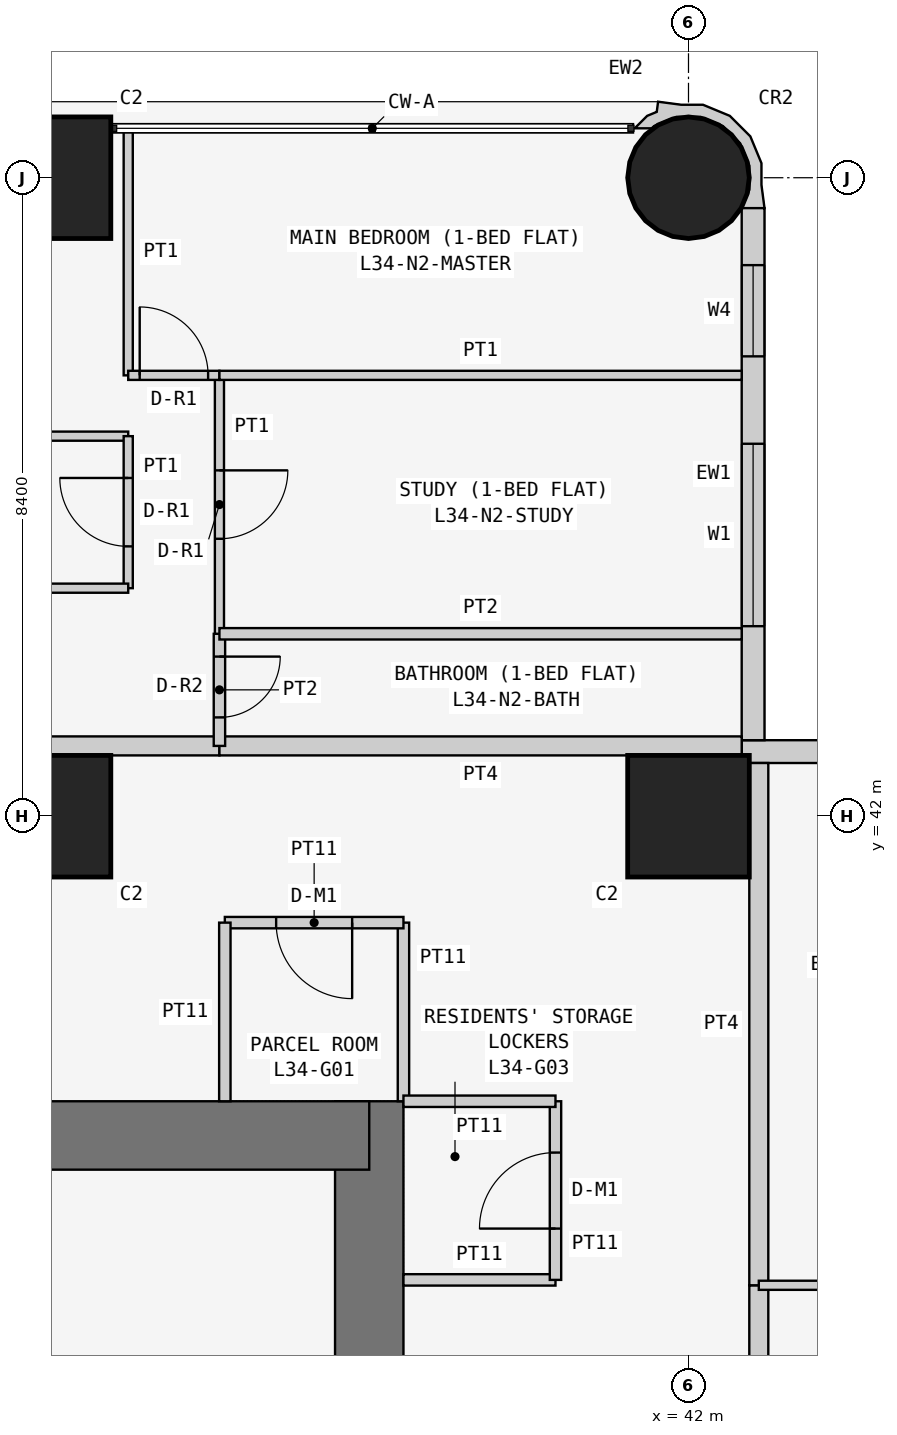
"""IFC4 building model, lengths in metres.
Left out: names, types, materials, properties, quantities, classifications, styles, units other than length and angle.
Written with IfcOpenShell. Run it as: python <this file> out.ifc"""

import sys

from ifc_helpers import new_model, si_unit, direction, frame, frame_2d, origin, origin_2d, place, context, subcontext, project, spatial, polyline, rectangle, circle, outline, extrude, element, fill, save


model = new_model("IFC4")
c1 = context("Model", 3, precision=1e-05, world=origin(), true_north=direction((0.0, 1.0)))
c2 = subcontext(c1, "Body", "Model", "MODEL_VIEW")
j1 = project(units=[si_unit("LENGTHUNIT", "METRE"), si_unit("PLANEANGLEUNIT", "RADIAN")], contexts=[c1])
p1 = place(None, origin())
s1 = spatial("IfcSite", under=j1, at=p1, CompositionType="ELEMENT")
p2 = place(p1, origin())
s2 = spatial("IfcBuilding", under=s1, at=p2, CompositionType="ELEMENT")
p3 = place(p2, frame((0.0, 0.0, 134.1)))
s3 = spatial("IfcBuildingStorey", under=s2, at=p3, CompositionType="ELEMENT", Elevation=134.1)
for number, where, z_axis, x_axis in (
    (1, (33.6, 42.0, 0.0), (0.0, 0.0, 1.0), (1.0, 0.0, 0.0)),
    (2, (33.6, 50.4, 0.0), (0.0, 0.0, 1.0), (1.0, 0.0, 0.0)),
    (3, (42.0, 42.0, 0.0), (0.0, 0.0, 1.0), (1.0, 0.0, 0.0)),
):
    element("IfcColumn", number, at=place(p3, frame(where, z_axis=z_axis, x_axis=x_axis)), inside=s3, PredefinedType="COLUMN", context=c2, shape_type="SweptSolid", body=[
        extrude(rectangle(XDim=1.6, YDim=1.6, at=origin_2d()), origin(), (0.0, 0.0, 1.0), 3.6),
    ])
p4 = place(p3, frame((42.0, 50.4, 0.0), z_axis=(0.0, 0.0, 1.0), x_axis=(1.0, 0.0, 0.0)))
e4 = element("IfcColumn", 4, at=p4, inside=s3, PredefinedType="COLUMN", context=c2, shape_type="SweptSolid", body=[
    extrude(circle(Radius=0.8, at=origin_2d()), origin(), (0.0, 0.0, 1.0), 3.6),
])
p5 = place(p3, frame((37.8, 21.0, 0.0), z_axis=(0.0, 0.0, 1.0), x_axis=(0.0, 1.0, 0.0)))
e5 = element("IfcWall", 5, at=p5, inside=s3, PredefinedType="SHEAR", context=c2, shape_type="SweptSolid", body=[
    extrude(rectangle(XDim=17.25, YDim=0.9, at=frame_2d((8.625, 0.0))), origin(), (0.0, 0.0, 1.0), 3.6),
])
p6 = place(p5, frame((5.2, 0.0, 0.0)))
e6 = element("IfcOpeningElement", 6, at=p6, cuts=e5, PredefinedType="OPENING", context=c2, shape_type="SweptSolid", body=[
    extrude(rectangle(XDim=1.2, YDim=2.1, at=frame_2d((0.6, 1.05))), frame((0.0, 0.46, 0.0), z_axis=(0.0, -1.0, 0.0), x_axis=(1.0, 0.0, 0.0)), (0.0, 0.0, 1.0), 0.92),
])
p7 = place(p3, frame((37.8, 37.8, 0.0), z_axis=(0.0, 0.0, 1.0), x_axis=(-1.0, 0.0, 0.0)))
e7 = element("IfcWall", 7, at=p7, inside=s3, PredefinedType="SHEAR", context=c2, shape_type="SweptSolid", body=[
    extrude(rectangle(XDim=17.25, YDim=0.9, at=frame_2d((8.625, 0.0))), origin(), (0.0, 0.0, 1.0), 3.6),
])
p8 = place(p3, frame((58.4, 42.85, 0.0), z_axis=(0.0, 0.0, 1.0), x_axis=(-1.0, 0.0, 0.0)))
e8 = element("IfcWall", 8, at=p8, inside=s3, PredefinedType="SOLIDWALL", context=c2, shape_type="SweptSolid", body=[
    extrude(rectangle(XDim=15.7, YDim=0.3, at=frame_2d((7.85, 0.0))), origin(), (0.0, 0.0, 1.0), 3.45),
])
p9 = place(p8, frame((12.4, 0.0, 0.9)))
e9 = element("IfcOpeningElement", 9, at=p9, cuts=e8, PredefinedType="OPENING", context=c2, shape_type="SweptSolid", body=[
    extrude(rectangle(XDim=1.8, YDim=1.5, at=frame_2d((0.9, 0.75))), frame((0.0, 0.16, 0.0), z_axis=(0.0, -1.0, 0.0), x_axis=(1.0, 0.0, 0.0)), (0.0, 0.0, 1.0), 0.32),
])
p10 = place(p8, frame((9.55, 0.0, 1.5)))
e10 = element("IfcOpeningElement", 10, at=p10, cuts=e8, PredefinedType="OPENING", context=c2, shape_type="SweptSolid", body=[
    extrude(rectangle(XDim=0.9, YDim=0.7, at=frame_2d((0.45, 0.35))), frame((0.0, 0.16, 0.0), z_axis=(0.0, -1.0, 0.0), x_axis=(1.0, 0.0, 0.0)), (0.0, 0.0, 1.0), 0.32),
])
p11 = place(p8, frame((5.1, 0.0, 0.9)))
e11 = element("IfcOpeningElement", 11, at=p11, cuts=e8, PredefinedType="OPENING", context=c2, shape_type="SweptSolid", body=[
    extrude(rectangle(XDim=1.8, YDim=1.5, at=frame_2d((0.9, 0.75))), frame((0.0, 0.16, 0.0), z_axis=(0.0, -1.0, 0.0), x_axis=(1.0, 0.0, 0.0)), (0.0, 0.0, 1.0), 0.32),
])
p12 = place(p8, frame((2.0, 0.0, 0.0)))
e12 = element("IfcOpeningElement", 12, at=p12, cuts=e8, PredefinedType="OPENING", context=c2, shape_type="SweptSolid", body=[
    extrude(rectangle(XDim=0.9, YDim=2.4, at=frame_2d((0.45, 1.2))), frame((0.0, 0.16, 0.0), z_axis=(0.0, -1.0, 0.0), x_axis=(1.0, 0.0, 0.0)), (0.0, 0.0, 1.0), 0.32),
])
p13 = place(p8, frame((0.7, 0.0, 0.9)))
e13 = element("IfcOpeningElement", 13, at=p13, cuts=e8, PredefinedType="OPENING", context=c2, shape_type="SweptSolid", body=[
    extrude(rectangle(XDim=1.2, YDim=1.5, at=frame_2d((0.6, 0.75))), frame((0.0, 0.16, 0.0), z_axis=(0.0, -1.0, 0.0), x_axis=(1.0, 0.0, 0.0)), (0.0, 0.0, 1.0), 0.32),
])
p14 = place(p3, frame((42.85, 43.0, 0.0), z_axis=(0.0, 0.0, 1.0), x_axis=(0.0, 1.0, 0.0)))
e14 = element("IfcWall", 14, at=p14, inside=s3, PredefinedType="SOLIDWALL", context=c2, shape_type="SweptSolid", body=[
    extrude(rectangle(XDim=7.0, YDim=0.3, at=frame_2d((3.5, 0.0))), origin(), (0.0, 0.0, 1.0), 3.45),
])
p15 = place(p14, frame((1.5, 0.0, 0.9)))
e15 = element("IfcOpeningElement", 15, at=p15, cuts=e14, PredefinedType="OPENING", context=c2, shape_type="SweptSolid", body=[
    extrude(rectangle(XDim=2.4, YDim=1.5, at=frame_2d((1.2, 0.75))), frame((0.0, 0.16, 0.0), z_axis=(0.0, -1.0, 0.0), x_axis=(1.0, 0.0, 0.0)), (0.0, 0.0, 1.0), 0.32),
])
p16 = place(p14, frame((5.05, 0.0, 0.9)))
e16 = element("IfcOpeningElement", 16, at=p16, cuts=e14, PredefinedType="OPENING", context=c2, shape_type="SweptSolid", body=[
    extrude(rectangle(XDim=1.2, YDim=1.5, at=frame_2d((0.6, 0.75))), frame((0.0, 0.16, 0.0), z_axis=(0.0, -1.0, 0.0), x_axis=(1.0, 0.0, 0.0)), (0.0, 0.0, 1.0), 0.32),
])
p17 = place(p3, frame((42.817, 50.073, 0.0), z_axis=(0.0, 0.0, 1.0), x_axis=(0.343276641956, 0.93923434088, 0.0)))
e17 = element("IfcWall", 17, at=p17, inside=s3, PredefinedType="SOLIDWALL", context=c2, shape_type="SweptSolid", body=[
    extrude(outline(polyline([(0.266, -0.055), (0.535, 0.044), (0.817, 0.302), (0.978, 0.648), (0.994, 1.03), (0.895, 1.3), (0.828, 1.598), (0.697, 1.569), (0.604, 1.67), (0.394, 1.767), (0.471, 1.556), (0.509, 1.539), (0.724, 1.304), (0.833, 1.005), (0.82, 0.687), (0.686, 0.397), (0.451, 0.182), (0.152, 0.073), (-0.116, 0.084), (-0.128, 0.078), (-0.146, 0.071), (-0.006, -0.197), (0.266, -0.055)])), origin(), (0.0, 0.0, 1.0), 3.45),
])
p18 = place(p3, frame((38.25, 38.25, 0.0), z_axis=(0.0, 0.0, 1.0), x_axis=(0.0, 1.0, 0.0)))
e18 = element("IfcWall", 18, at=p18, inside=s3, PredefinedType="PARTITIONING", context=c2, shape_type="SweptSolid", body=[
    extrude(rectangle(XDim=2.35, YDim=0.15, at=frame_2d((1.175, 0.0))), origin(), (0.0, 0.0, 1.0), 3.45),
])
p19 = place(p3, frame((38.25, 40.6, 0.0), z_axis=(0.0, 0.0, 1.0), x_axis=(-1.0, 0.0, 0.0)))
e19 = element("IfcWall", 19, at=p19, inside=s3, PredefinedType="PARTITIONING", context=c2, shape_type="SweptSolid", body=[
    extrude(rectangle(XDim=2.35, YDim=0.15, at=frame_2d((1.175, 0.0))), origin(), (0.0, 0.0, 1.0), 3.45),
])
p20 = place(p19, frame((0.675, 0.0, 0.0)))
e20 = element("IfcOpeningElement", 20, at=p20, cuts=e19, PredefinedType="OPENING", context=c2, shape_type="SweptSolid", body=[
    extrude(rectangle(XDim=1.0, YDim=2.1, at=frame_2d((0.5, 1.05))), frame((0.0, 0.085, 0.0), z_axis=(0.0, -1.0, 0.0), x_axis=(1.0, 0.0, 0.0)), (0.0, 0.0, 1.0), 0.17),
])
p21 = place(p3, frame((35.9, 40.6, 0.0), z_axis=(0.0, 0.0, 1.0), x_axis=(0.0, -1.0, 0.0)))
e21 = element("IfcWall", 21, at=p21, inside=s3, PredefinedType="PARTITIONING", context=c2, shape_type="SweptSolid", body=[
    extrude(rectangle(XDim=2.35, YDim=0.15, at=frame_2d((1.175, 0.0))), origin(), (0.0, 0.0, 1.0), 3.45),
])
p22 = place(p3, frame((38.25, 35.9, 0.0), z_axis=(0.0, 0.0, 1.0), x_axis=(1.0, 0.0, 0.0)))
e22 = element("IfcWall", 22, at=p22, inside=s3, PredefinedType="PARTITIONING", context=c2, shape_type="SweptSolid", body=[
    extrude(rectangle(XDim=2.0, YDim=0.15, at=frame_2d((1.0, 0.0))), origin(), (0.0, 0.0, 1.0), 3.45),
])
p23 = place(p3, frame((40.25, 35.9, 0.0), z_axis=(0.0, 0.0, 1.0), x_axis=(0.0, 1.0, 0.0)))
e23 = element("IfcWall", 23, at=p23, inside=s3, PredefinedType="PARTITIONING", context=c2, shape_type="SweptSolid", body=[
    extrude(rectangle(XDim=2.35, YDim=0.15, at=frame_2d((1.175, 0.0))), origin(), (0.0, 0.0, 1.0), 3.45),
])
p24 = place(p23, frame((0.675, 0.0, 0.0)))
e24 = element("IfcOpeningElement", 24, at=p24, cuts=e23, PredefinedType="OPENING", context=c2, shape_type="SweptSolid", body=[
    extrude(rectangle(XDim=1.0, YDim=2.1, at=frame_2d((0.5, 1.05))), frame((0.0, 0.085, 0.0), z_axis=(0.0, -1.0, 0.0), x_axis=(1.0, 0.0, 0.0)), (0.0, 0.0, 1.0), 0.17),
])
p25 = place(p3, frame((40.25, 38.25, 0.0), z_axis=(0.0, 0.0, 1.0), x_axis=(-1.0, 0.0, 0.0)))
e25 = element("IfcWall", 25, at=p25, inside=s3, PredefinedType="PARTITIONING", context=c2, shape_type="SweptSolid", body=[
    extrude(rectangle(XDim=2.0, YDim=0.15, at=frame_2d((1.0, 0.0))), origin(), (0.0, 0.0, 1.0), 3.45),
])
p26 = place(p3, frame((29.4, 42.925, 0.0), z_axis=(0.0, 0.0, 1.0), x_axis=(1.0, 0.0, 0.0)))
e26 = element("IfcWall", 26, at=p26, inside=s3, PredefinedType="PARTITIONING", context=c2, shape_type="SweptSolid", body=[
    extrude(rectangle(XDim=6.429, YDim=0.25, at=frame_2d((3.215, 0.0))), origin(), (0.0, 0.0, 1.0), 3.45),
])
p27 = place(p26, frame((0.5, 0.0, 0.0)))
e27 = element("IfcOpeningElement", 27, at=p27, cuts=e26, PredefinedType="OPENING", context=c2, shape_type="SweptSolid", body=[
    extrude(rectangle(XDim=1.0, YDim=2.1, at=frame_2d((0.5, 1.05))), frame((0.0, 0.135, 0.0), z_axis=(0.0, -1.0, 0.0), x_axis=(1.0, 0.0, 0.0)), (0.0, 0.0, 1.0), 0.27),
])
p28 = place(p3, frame((35.829, 42.925, 0.0), z_axis=(0.0, 0.0, 1.0), x_axis=(1.0, 0.0, 0.0)))
e28 = element("IfcWall", 28, at=p28, inside=s3, PredefinedType="PARTITIONING", context=c2, shape_type="SweptSolid", body=[
    extrude(rectangle(XDim=6.871, YDim=0.25, at=frame_2d((3.436, 0.0))), origin(), (0.0, 0.0, 1.0), 3.45),
])
p29 = place(p3, frame((42.925, 35.829, 0.0), z_axis=(0.0, 0.0, 1.0), x_axis=(0.0, -1.0, 0.0)))
e29 = element("IfcWall", 29, at=p29, inside=s3, PredefinedType="PARTITIONING", context=c2, shape_type="SweptSolid", body=[
    extrude(rectangle(XDim=1.2, YDim=0.25, at=frame_2d((0.6, 0.0))), origin(), (0.0, 0.0, 1.0), 3.45),
])
p30 = place(p3, frame((42.925, 42.7, 0.0), z_axis=(0.0, 0.0, 1.0), x_axis=(0.0, -1.0, 0.0)))
e30 = element("IfcWall", 30, at=p30, inside=s3, PredefinedType="PARTITIONING", context=c2, shape_type="SweptSolid", body=[
    extrude(rectangle(XDim=6.871, YDim=0.25, at=frame_2d((3.436, 0.0))), origin(), (0.0, 0.0, 1.0), 3.45),
])
p31 = place(p3, frame((29.4, 47.0, 0.0), z_axis=(0.0, 0.0, 1.0), x_axis=(1.0, 0.0, 0.0)))
e31 = element("IfcWall", 31, at=p31, inside=s3, PredefinedType="PARTITIONING", context=c2, shape_type="SweptSolid", body=[
    extrude(rectangle(XDim=5.229, YDim=0.12, at=frame_2d((2.615, 0.0))), origin(), (0.0, 0.0, 1.0), 3.45),
])
p32 = place(p3, frame((34.629, 47.0, 0.0), z_axis=(0.0, 0.0, 1.0), x_axis=(0.0, -1.0, 0.0)))
e32 = element("IfcWall", 32, at=p32, inside=s3, PredefinedType="PARTITIONING", context=c2, shape_type="SweptSolid", body=[
    extrude(rectangle(XDim=2.0, YDim=0.12, at=frame_2d((1.0, 0.0))), origin(), (0.0, 0.0, 1.0), 3.45),
])
p33 = place(p32, frame((0.55, 0.0, 0.0)))
e33 = element("IfcOpeningElement", 33, at=p33, cuts=e32, PredefinedType="OPENING", context=c2, shape_type="SweptSolid", body=[
    extrude(rectangle(XDim=0.9, YDim=2.1, at=frame_2d((0.45, 1.05))), frame((0.0, 0.07, 0.0), z_axis=(0.0, -1.0, 0.0), x_axis=(1.0, 0.0, 0.0)), (0.0, 0.0, 1.0), 0.14),
])
p34 = place(p3, frame((34.629, 45.0, 0.0), z_axis=(0.0, 0.0, 1.0), x_axis=(-1.0, 0.0, 0.0)))
e34 = element("IfcWall", 34, at=p34, inside=s3, PredefinedType="PARTITIONING", context=c2, shape_type="SweptSolid", body=[
    extrude(rectangle(XDim=5.229, YDim=0.12, at=frame_2d((2.615, 0.0))), origin(), (0.0, 0.0, 1.0), 3.45),
])
p35 = place(p3, frame((35.829, 44.4, 0.0), z_axis=(0.0, 0.0, 1.0), x_axis=(0.0, -1.0, 0.0)))
e35 = element("IfcWall", 35, at=p35, inside=s3, PredefinedType="PARTITIONING", context=c2, shape_type="SweptSolid", body=[
    extrude(rectangle(XDim=1.475, YDim=0.15, at=frame_2d((0.737, 0.0))), origin(), (0.0, 0.0, 1.0), 3.45),
])
p36 = place(p35, frame((0.3, 0.0, 0.0)))
e36 = element("IfcOpeningElement", 36, at=p36, cuts=e35, PredefinedType="OPENING", context=c2, shape_type="SweptSolid", body=[
    extrude(rectangle(XDim=0.8, YDim=2.1, at=frame_2d((0.4, 1.05))), frame((0.0, 0.085, 0.0), z_axis=(0.0, -1.0, 0.0), x_axis=(1.0, 0.0, 0.0)), (0.0, 0.0, 1.0), 0.17),
])
p37 = place(p3, frame((35.829, 47.8, 0.0), z_axis=(0.0, 0.0, 1.0), x_axis=(0.0, -1.0, 0.0)))
e37 = element("IfcWall", 37, at=p37, inside=s3, PredefinedType="PARTITIONING", context=c2, shape_type="SweptSolid", body=[
    extrude(rectangle(XDim=3.4, YDim=0.12, at=frame_2d((1.7, 0.0))), origin(), (0.0, 0.0, 1.0), 3.45),
])
p38 = place(p37, frame((1.25, 0.0, 0.0)))
e38 = element("IfcOpeningElement", 38, at=p38, cuts=e37, PredefinedType="OPENING", context=c2, shape_type="SweptSolid", body=[
    extrude(rectangle(XDim=0.9, YDim=2.1, at=frame_2d((0.45, 1.05))), frame((0.0, 0.07, 0.0), z_axis=(0.0, -1.0, 0.0), x_axis=(1.0, 0.0, 0.0)), (0.0, 0.0, 1.0), 0.14),
])
p39 = place(p3, frame((34.629, 51.05, 0.0), z_axis=(0.0, 0.0, 1.0), x_axis=(0.0, -1.0, 0.0)))
e39 = element("IfcWall", 39, at=p39, inside=s3, PredefinedType="PARTITIONING", context=c2, shape_type="SweptSolid", body=[
    extrude(rectangle(XDim=3.25, YDim=0.12, at=frame_2d((1.625, 0.0))), origin(), (0.0, 0.0, 1.0), 3.45),
])
p40 = place(p3, frame((34.629, 47.8, 0.0), z_axis=(0.0, 0.0, 1.0), x_axis=(1.0, 0.0, 0.0)))
e40 = element("IfcWall", 40, at=p40, inside=s3, PredefinedType="PARTITIONING", context=c2, shape_type="SweptSolid", body=[
    extrude(rectangle(XDim=1.2, YDim=0.12, at=frame_2d((0.6, 0.0))), origin(), (0.0, 0.0, 1.0), 3.45),
])
p41 = place(p40, frame((0.151, 0.0, 0.0)))
e41 = element("IfcOpeningElement", 41, at=p41, cuts=e40, PredefinedType="OPENING", context=c2, shape_type="SweptSolid", body=[
    extrude(rectangle(XDim=0.9, YDim=2.1, at=frame_2d((0.45, 1.05))), frame((0.0, 0.07, 0.0), z_axis=(0.0, -1.0, 0.0), x_axis=(1.0, 0.0, 0.0)), (0.0, 0.0, 1.0), 0.14),
])
p42 = place(p3, frame((35.829, 44.4, 0.0), z_axis=(0.0, 0.0, 1.0), x_axis=(1.0, 0.0, 0.0)))
e42 = element("IfcWall", 42, at=p42, inside=s3, PredefinedType="PARTITIONING", context=c2, shape_type="SweptSolid", body=[
    extrude(rectangle(XDim=6.871, YDim=0.15, at=frame_2d((3.436, 0.0))), origin(), (0.0, 0.0, 1.0), 3.45),
])
p43 = place(p3, frame((35.829, 47.8, 0.0), z_axis=(0.0, 0.0, 1.0), x_axis=(1.0, 0.0, 0.0)))
e43 = element("IfcWall", 43, at=p43, inside=s3, PredefinedType="PARTITIONING", context=c2, shape_type="SweptSolid", body=[
    extrude(rectangle(XDim=6.871, YDim=0.12, at=frame_2d((3.436, 0.0))), origin(), (0.0, 0.0, 1.0), 3.45),
])
p44 = place(p3, frame((47.6, 35.829, 0.0), z_axis=(0.0, 0.0, 1.0), x_axis=(-1.0, 0.0, 0.0)))
e44 = element("IfcWall", 44, at=p44, inside=s3, PredefinedType="PARTITIONING", context=c2, shape_type="SweptSolid", body=[
    extrude(rectangle(XDim=4.675, YDim=0.12, at=frame_2d((2.337, 0.0))), origin(), (0.0, 0.0, 1.0), 3.45),
])
p45 = place(p44, frame((1.85, 0.0, 0.0)))
e45 = element("IfcOpeningElement", 45, at=p45, cuts=e44, PredefinedType="OPENING", context=c2, shape_type="SweptSolid", body=[
    extrude(rectangle(XDim=0.9, YDim=2.1, at=frame_2d((0.45, 1.05))), frame((0.0, 0.07, 0.0), z_axis=(0.0, -1.0, 0.0), x_axis=(1.0, 0.0, 0.0)), (0.0, 0.0, 1.0), 0.14),
])
p46 = place(p15, origin())
e46 = element("IfcWindow", 46, at=p46, inside=s3, PartitioningType="SINGLE_PANEL", PredefinedType="WINDOW", context=c2, shape_type="SweptSolid", body=[
    extrude(rectangle(XDim=2.4, YDim=1.5, at=frame_2d((1.2, 0.75))), frame((0.0, 0.03, 0.0), z_axis=(0.0, -1.0, 0.0), x_axis=(1.0, 0.0, 0.0)), (0.0, 0.0, 1.0), 0.06),
])
fill(e15, e46)
p47 = place(p16, origin())
e47 = element("IfcWindow", 47, at=p47, inside=s3, PartitioningType="SINGLE_PANEL", PredefinedType="WINDOW", context=c2, shape_type="SweptSolid", body=[
    extrude(rectangle(XDim=1.2, YDim=1.5, at=frame_2d((0.6, 0.75))), frame((0.0, 0.03, 0.0), z_axis=(0.0, -1.0, 0.0), x_axis=(1.0, 0.0, 0.0)), (0.0, 0.0, 1.0), 0.06),
])
fill(e16, e47)
p48 = place(p20, origin())
e48 = element("IfcDoor", 48, at=p48, inside=s3, OperationType="SINGLE_SWING_LEFT", PredefinedType="DOOR", context=c2, shape_type="SweptSolid", body=[
    extrude(rectangle(XDim=1.0, YDim=2.1, at=frame_2d((0.5, 1.05))), frame((0.0, 0.025, 0.0), z_axis=(0.0, -1.0, 0.0), x_axis=(1.0, 0.0, 0.0)), (0.0, 0.0, 1.0), 0.05),
])
fill(e20, e48)
p49 = place(p24, origin())
e49 = element("IfcDoor", 49, at=p49, inside=s3, OperationType="SINGLE_SWING_LEFT", PredefinedType="DOOR", context=c2, shape_type="SweptSolid", body=[
    extrude(rectangle(XDim=1.0, YDim=2.1, at=frame_2d((0.5, 1.05))), frame((0.0, 0.025, 0.0), z_axis=(0.0, -1.0, 0.0), x_axis=(1.0, 0.0, 0.0)), (0.0, 0.0, 1.0), 0.05),
])
fill(e24, e49)
p50 = place(p33, frame((0.9, 0.0, 0.0), z_axis=(0.0, 0.0, 1.0), x_axis=(-1.0, 0.0, 0.0)))
e50 = element("IfcDoor", 50, at=p50, inside=s3, OperationType="SINGLE_SWING_RIGHT", PredefinedType="DOOR", context=c2, shape_type="SweptSolid", body=[
    extrude(rectangle(XDim=0.9, YDim=2.1, at=frame_2d((0.45, 1.05))), frame((0.0, 0.025, 0.0), z_axis=(0.0, -1.0, 0.0), x_axis=(1.0, 0.0, 0.0)), (0.0, 0.0, 1.0), 0.05),
])
fill(e33, e50)
p51 = place(p36, origin())
e51 = element("IfcDoor", 51, at=p51, inside=s3, OperationType="SINGLE_SWING_LEFT", PredefinedType="DOOR", context=c2, shape_type="SweptSolid", body=[
    extrude(rectangle(XDim=0.8, YDim=2.1, at=frame_2d((0.4, 1.05))), frame((0.0, 0.025, 0.0), z_axis=(0.0, -1.0, 0.0), x_axis=(1.0, 0.0, 0.0)), (0.0, 0.0, 1.0), 0.05),
])
fill(e36, e51)
p52 = place(p38, origin())
e52 = element("IfcDoor", 52, at=p52, inside=s3, OperationType="SINGLE_SWING_LEFT", PredefinedType="DOOR", context=c2, shape_type="SweptSolid", body=[
    extrude(rectangle(XDim=0.9, YDim=2.1, at=frame_2d((0.45, 1.05))), frame((0.0, 0.025, 0.0), z_axis=(0.0, -1.0, 0.0), x_axis=(1.0, 0.0, 0.0)), (0.0, 0.0, 1.0), 0.05),
])
fill(e38, e52)
p53 = place(p41, origin())
e53 = element("IfcDoor", 53, at=p53, inside=s3, OperationType="SINGLE_SWING_LEFT", PredefinedType="DOOR", context=c2, shape_type="SweptSolid", body=[
    extrude(rectangle(XDim=0.9, YDim=2.1, at=frame_2d((0.45, 1.05))), frame((0.0, 0.025, 0.0), z_axis=(0.0, -1.0, 0.0), x_axis=(1.0, 0.0, 0.0)), (0.0, 0.0, 1.0), 0.05),
])
fill(e41, e53)
save(model, sys.argv[1])
